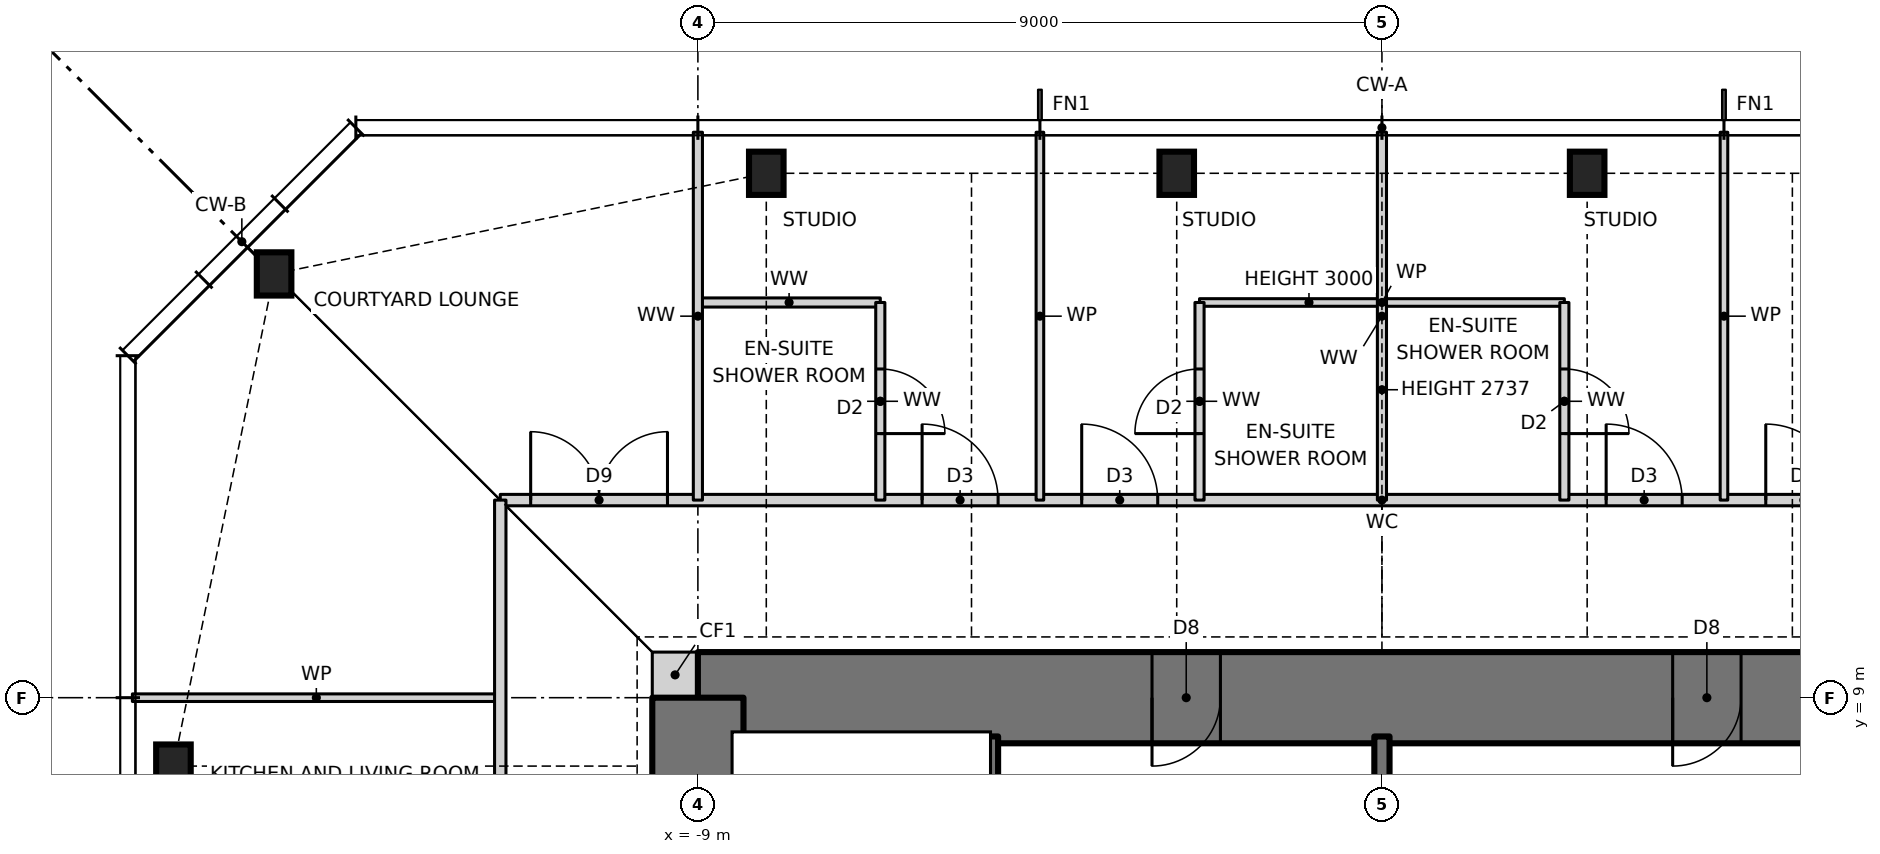
"""IFC4 building model, lengths in metres.
Left out: names, types, materials, properties, quantities, classifications, styles, units other than length and angle.
Written with IfcOpenShell. Run it as: python <this file> out.ifc"""

import sys

from ifc_helpers import new_model, si_unit, direction, frame, frame_2d, origin, origin_2d, place, context, subcontext, project, spatial, rectangle, i_section, extrude, element, fill, save


model = new_model("IFC4")
c1 = context("Model", 3, precision=1e-05, world=origin(), true_north=direction((0.0, 1.0)))
c2 = subcontext(c1, "Body", "Model", "MODEL_VIEW")
j1 = project(units=[si_unit("LENGTHUNIT", "METRE"), si_unit("PLANEANGLEUNIT", "RADIAN")], contexts=[c1])
p1 = place(None, origin())
s1 = spatial("IfcSite", under=j1, at=p1, CompositionType="ELEMENT")
p2 = place(p1, origin())
s2 = spatial("IfcBuilding", under=s1, at=p2, CompositionType="ELEMENT")
p3 = place(p2, frame((0.0, 0.0, 225.5)))
s3 = spatial("IfcBuildingStorey", under=s2, at=p3, CompositionType="ELEMENT", Elevation=225.5)
for number, where, z_axis, x_axis in (
    (1, (2.7, 15.9, 0.0), (0.0, 0.0, 1.0), (1.0, 0.0, 0.0)),
    (2, (-2.7, 15.9, 0.0), (0.0, 0.0, 1.0), (1.0, 0.0, 0.0)),
    (3, (-8.1, 15.9, 0.0), (0.0, 0.0, 1.0), (1.0, 0.0, 0.0)),
    (4, (-14.576, 14.576, 0.0), (0.0, 0.0, 1.0), (1.0, 0.0, 0.0)),
    (5, (-15.9, 8.1, 0.0), (0.0, 0.0, 1.0), (1.0, 0.0, 0.0)),
):
    element("IfcColumn", number, at=place(p3, frame(where, z_axis=z_axis, x_axis=x_axis)), inside=s3, PredefinedType="COLUMN", context=c2, shape_type="SweptSolid", body=[
        extrude(i_section(OverallWidth=0.455, OverallDepth=0.569, WebThickness=0.078, FlangeThickness=0.125, at=origin_2d()), origin(), (0.0, 0.0, 1.0), 3.5),
    ])
p4 = place(p3, frame((-9.6, 9.3, 0.0), z_axis=(0.0, 0.0, 1.0), x_axis=(1.0, 0.0, 0.0)))
e6 = element("IfcWall", 6, at=p4, inside=s3, PredefinedType="SOLIDWALL", context=c2, shape_type="SweptSolid", body=[
    extrude(rectangle(XDim=0.6, YDim=0.6, at=frame_2d((0.3, 0.0))), origin(), (0.0, 0.0, 1.0), 3.5),
])
p5 = place(p3, frame((9.0, 9.0, 0.0), z_axis=(0.0, 0.0, 1.0), x_axis=(-1.0, 0.0, 0.0)))
e7 = element("IfcWall", 7, at=p5, inside=s3, PredefinedType="SHEAR", context=c2, shape_type="SweptSolid", body=[
    extrude(rectangle(XDim=18.0, YDim=1.2, at=frame_2d((9.0, 0.0))), origin(), (0.0, 0.0, 1.0), 3.5),
])
p6 = place(p5, frame((11.125, 0.0, 0.0)))
e8 = element("IfcOpeningElement", 8, at=p6, cuts=e7, PredefinedType="OPENING", context=c2, shape_type="SweptSolid", body=[
    extrude(rectangle(XDim=0.9, YDim=2.1, at=frame_2d((0.45, 1.05))), frame((0.0, 0.61, 0.0), z_axis=(0.0, -1.0, 0.0), x_axis=(1.0, 0.0, 0.0)), (0.0, 0.0, 1.0), 1.22),
])
p7 = place(p5, frame((4.275, 0.0, 0.0)))
e9 = element("IfcOpeningElement", 9, at=p7, cuts=e7, PredefinedType="OPENING", context=c2, shape_type="SweptSolid", body=[
    extrude(rectangle(XDim=0.9, YDim=2.1, at=frame_2d((0.45, 1.05))), frame((0.0, 0.61, 0.0), z_axis=(0.0, -1.0, 0.0), x_axis=(1.0, 0.0, 0.0)), (0.0, 0.0, 1.0), 1.22),
])
p8 = place(p3, frame((-9.0, 9.0, 0.0), z_axis=(0.0, 0.0, 1.0), x_axis=(0.0, -1.0, 0.0)))
e10 = element("IfcWall", 10, at=p8, inside=s3, PredefinedType="SHEAR", context=c2, shape_type="SweptSolid", body=[
    extrude(rectangle(XDim=18.0, YDim=1.2, at=frame_2d((9.0, 0.0))), origin(), (0.0, 0.0, 1.0), 3.5),
])
p9 = place(p8, frame((8.5, 0.0, 0.0)))
e11 = element("IfcOpeningElement", 11, at=p9, cuts=e10, PredefinedType="OPENING", context=c2, shape_type="SweptSolid", body=[
    extrude(rectangle(XDim=1.0, YDim=2.1, at=frame_2d((0.5, 1.05))), frame((0.0, 0.61, 0.0), z_axis=(0.0, -1.0, 0.0), x_axis=(1.0, 0.0, 0.0)), (0.0, 0.0, 1.0), 1.22),
])
p10 = place(p3, frame((-16.44, 9.0, 0.0), z_axis=(0.0, 0.0, 1.0), x_axis=(1.0, 0.0, 0.0)))
e12 = element("IfcWall", 12, at=p10, inside=s3, PredefinedType="PARTITIONING", context=c2, shape_type="SweptSolid", body=[
    extrude(rectangle(XDim=4.84, YDim=0.1, at=frame_2d((2.42, 0.0))), origin(), (0.0, 0.0, 1.0), 3.27),
])
p11 = place(p3, frame((-11.6, 11.6, 0.0), z_axis=(0.0, 0.0, 1.0), x_axis=(1.0, 0.0, 0.0)))
e13 = element("IfcWall", 13, at=p11, inside=s3, PredefinedType="PARTITIONING", context=c2, shape_type="SweptSolid", body=[
    extrude(rectangle(XDim=23.2, YDim=0.15, at=frame_2d((11.6, 0.0))), origin(), (0.0, 0.0, 1.0), 3.27),
])
p12 = place(p11, frame((16.65, 0.0, 0.0)))
e14 = element("IfcOpeningElement", 14, at=p12, cuts=e13, PredefinedType="OPENING", context=c2, shape_type="SweptSolid", body=[
    extrude(rectangle(XDim=1.0, YDim=2.1, at=frame_2d((0.5, 1.05))), frame((0.0, 0.085, 0.0), z_axis=(0.0, -1.0, 0.0), x_axis=(1.0, 0.0, 0.0)), (0.0, 0.0, 1.0), 0.17),
])
p13 = place(p11, frame((14.55, 0.0, 0.0)))
e15 = element("IfcOpeningElement", 15, at=p13, cuts=e13, PredefinedType="OPENING", context=c2, shape_type="SweptSolid", body=[
    extrude(rectangle(XDim=1.0, YDim=2.1, at=frame_2d((0.5, 1.05))), frame((0.0, 0.085, 0.0), z_axis=(0.0, -1.0, 0.0), x_axis=(1.0, 0.0, 0.0)), (0.0, 0.0, 1.0), 0.17),
])
p14 = place(p11, frame((7.65, 0.0, 0.0)))
e16 = element("IfcOpeningElement", 16, at=p14, cuts=e13, PredefinedType="OPENING", context=c2, shape_type="SweptSolid", body=[
    extrude(rectangle(XDim=1.0, YDim=2.1, at=frame_2d((0.5, 1.05))), frame((0.0, 0.085, 0.0), z_axis=(0.0, -1.0, 0.0), x_axis=(1.0, 0.0, 0.0)), (0.0, 0.0, 1.0), 0.17),
])
p15 = place(p11, frame((5.55, 0.0, 0.0)))
e17 = element("IfcOpeningElement", 17, at=p15, cuts=e13, PredefinedType="OPENING", context=c2, shape_type="SweptSolid", body=[
    extrude(rectangle(XDim=1.0, YDim=2.1, at=frame_2d((0.5, 1.05))), frame((0.0, 0.085, 0.0), z_axis=(0.0, -1.0, 0.0), x_axis=(1.0, 0.0, 0.0)), (0.0, 0.0, 1.0), 0.17),
])
p16 = place(p11, frame((0.4, 0.0, 0.0)))
e18 = element("IfcOpeningElement", 18, at=p16, cuts=e13, PredefinedType="OPENING", context=c2, shape_type="SweptSolid", body=[
    extrude(rectangle(XDim=1.8, YDim=2.1, at=frame_2d((0.9, 1.05))), frame((0.0, 0.085, 0.0), z_axis=(0.0, -1.0, 0.0), x_axis=(1.0, 0.0, 0.0)), (0.0, 0.0, 1.0), 0.17),
])
p17 = place(p3, frame((-9.0, 14.2, 0.0), z_axis=(0.0, 0.0, 1.0), x_axis=(1.0, 0.0, 0.0)))
e19 = element("IfcWall", 19, at=p17, inside=s3, PredefinedType="PARTITIONING", context=c2, shape_type="SweptSolid", body=[
    extrude(rectangle(XDim=2.4, YDim=0.12, at=frame_2d((1.2, 0.0))), origin(), (0.0, 0.0, 1.0), 3.27),
])
p18 = place(p3, frame((-2.4, 14.2, 0.0), z_axis=(0.0, 0.0, 1.0), x_axis=(1.0, 0.0, 0.0)))
e20 = element("IfcWall", 20, at=p18, inside=s3, PredefinedType="PARTITIONING", context=c2, shape_type="SweptSolid", body=[
    extrude(rectangle(XDim=4.8, YDim=0.1, at=frame_2d((2.4, 0.0))), origin(), (0.0, 0.0, 1.0), 3.0),
])
p19 = place(p3, frame((4.5, 11.6, 0.0), z_axis=(0.0, 0.0, 1.0), x_axis=(0.0, 1.0, 0.0)))
e21 = element("IfcWall", 21, at=p19, inside=s3, PredefinedType="PARTITIONING", context=c2, shape_type="SweptSolid", body=[
    extrude(rectangle(XDim=4.84, YDim=0.1, at=frame_2d((2.42, 0.0))), origin(), (0.0, 0.0, 1.0), 3.27),
])
p20 = place(p3, frame((2.4, 11.6, 0.0), z_axis=(0.0, 0.0, 1.0), x_axis=(0.0, 1.0, 0.0)))
e22 = element("IfcWall", 22, at=p20, inside=s3, PredefinedType="PARTITIONING", context=c2, shape_type="SweptSolid", body=[
    extrude(rectangle(XDim=2.6, YDim=0.12, at=frame_2d((1.3, 0.0))), origin(), (0.0, 0.0, 1.0), 3.27),
])
p21 = place(p20, frame((0.875, 0.0, 0.0)))
e23 = element("IfcOpeningElement", 23, at=p21, cuts=e22, PredefinedType="OPENING", context=c2, shape_type="SweptSolid", body=[
    extrude(rectangle(XDim=0.85, YDim=2.1, at=frame_2d((0.425, 1.05))), frame((0.0, 0.07, 0.0), z_axis=(0.0, -1.0, 0.0), x_axis=(1.0, 0.0, 0.0)), (0.0, 0.0, 1.0), 0.14),
])
p22 = place(p3, frame((0.0, 4.4, 0.0), z_axis=(0.0, 0.0, 1.0), x_axis=(0.0, 1.0, 0.0)))
e24 = element("IfcWall", 24, at=p22, inside=s3, PredefinedType="SOLIDWALL", context=c2, shape_type="SweptSolid", body=[
    extrude(rectangle(XDim=4.09, YDim=0.2, at=frame_2d((2.045, 0.0))), origin(), (0.0, 0.0, 1.0), 3.5),
])
p23 = place(p3, frame((0.0, 11.6, 0.0), z_axis=(0.0, 0.0, 1.0), x_axis=(0.0, 1.0, 0.0)))
e25 = element("IfcWall", 25, at=p23, inside=s3, PredefinedType="PARTITIONING", context=c2, shape_type="SweptSolid", body=[
    extrude(rectangle(XDim=4.84, YDim=0.12, at=frame_2d((2.42, 0.0))), origin(), (0.0, 0.0, 1.0), 2.737),
])
p24 = place(p3, frame((-2.4, 11.6, 0.0), z_axis=(0.0, 0.0, 1.0), x_axis=(0.0, 1.0, 0.0)))
e26 = element("IfcWall", 26, at=p24, inside=s3, PredefinedType="PARTITIONING", context=c2, shape_type="SweptSolid", body=[
    extrude(rectangle(XDim=2.6, YDim=0.12, at=frame_2d((1.3, 0.0))), origin(), (0.0, 0.0, 1.0), 3.27),
])
p25 = place(p24, frame((0.875, 0.0, 0.0)))
e27 = element("IfcOpeningElement", 27, at=p25, cuts=e26, PredefinedType="OPENING", context=c2, shape_type="SweptSolid", body=[
    extrude(rectangle(XDim=0.85, YDim=2.1, at=frame_2d((0.425, 1.05))), frame((0.0, 0.07, 0.0), z_axis=(0.0, -1.0, 0.0), x_axis=(1.0, 0.0, 0.0)), (0.0, 0.0, 1.0), 0.14),
])
p26 = place(p3, frame((-4.5, 11.6, 0.0), z_axis=(0.0, 0.0, 1.0), x_axis=(0.0, 1.0, 0.0)))
e28 = element("IfcWall", 28, at=p26, inside=s3, PredefinedType="PARTITIONING", context=c2, shape_type="SweptSolid", body=[
    extrude(rectangle(XDim=4.84, YDim=0.1, at=frame_2d((2.42, 0.0))), origin(), (0.0, 0.0, 1.0), 3.27),
])
p27 = place(p3, frame((-5.15, 1.6, 0.0), z_axis=(0.0, 0.0, 1.0), x_axis=(0.0, 1.0, 0.0)))
e29 = element("IfcWall", 29, at=p27, inside=s3, PredefinedType="SOLIDWALL", context=c2, shape_type="SweptSolid", body=[
    extrude(rectangle(XDim=6.89, YDim=0.2, at=frame_2d((3.445, 0.0))), origin(), (0.0, 0.0, 1.0), 3.5),
])
p28 = place(p3, frame((-6.6, 11.6, 0.0), z_axis=(0.0, 0.0, 1.0), x_axis=(0.0, 1.0, 0.0)))
e30 = element("IfcWall", 30, at=p28, inside=s3, PredefinedType="PARTITIONING", context=c2, shape_type="SweptSolid", body=[
    extrude(rectangle(XDim=2.6, YDim=0.12, at=frame_2d((1.3, 0.0))), origin(), (0.0, 0.0, 1.0), 3.27),
])
p29 = place(p28, frame((0.875, 0.0, 0.0)))
e31 = element("IfcOpeningElement", 31, at=p29, cuts=e30, PredefinedType="OPENING", context=c2, shape_type="SweptSolid", body=[
    extrude(rectangle(XDim=0.85, YDim=2.1, at=frame_2d((0.425, 1.05))), frame((0.0, 0.07, 0.0), z_axis=(0.0, -1.0, 0.0), x_axis=(1.0, 0.0, 0.0)), (0.0, 0.0, 1.0), 0.14),
])
p30 = place(p3, frame((-9.0, 11.6, 0.0), z_axis=(0.0, 0.0, 1.0), x_axis=(0.0, 1.0, 0.0)))
e32 = element("IfcWall", 32, at=p30, inside=s3, PredefinedType="PARTITIONING", context=c2, shape_type="SweptSolid", body=[
    extrude(rectangle(XDim=4.84, YDim=0.12, at=frame_2d((2.42, 0.0))), origin(), (0.0, 0.0, 1.0), 3.27),
])
p31 = place(p3, frame((-11.6, -11.6, 0.0), z_axis=(0.0, 0.0, 1.0), x_axis=(0.0, 1.0, 0.0)))
e33 = element("IfcWall", 33, at=p31, inside=s3, PredefinedType="PARTITIONING", context=c2, shape_type="SweptSolid", body=[
    extrude(rectangle(XDim=23.2, YDim=0.15, at=frame_2d((11.6, 0.0))), origin(), (0.0, 0.0, 1.0), 3.27),
])
p32 = place(p31, frame((16.5, 0.0, 0.0)))
e34 = element("IfcOpeningElement", 34, at=p32, cuts=e33, PredefinedType="OPENING", context=c2, shape_type="SweptSolid", body=[
    extrude(rectangle(XDim=1.0, YDim=2.1, at=frame_2d((0.5, 1.05))), frame((0.0, 0.085, 0.0), z_axis=(0.0, -1.0, 0.0), x_axis=(1.0, 0.0, 0.0)), (0.0, 0.0, 1.0), 0.17),
])
p33 = place(p31, frame((10.05, 0.0, 0.0)))
e35 = element("IfcOpeningElement", 35, at=p33, cuts=e33, PredefinedType="OPENING", context=c2, shape_type="SweptSolid", body=[
    extrude(rectangle(XDim=1.0, YDim=2.1, at=frame_2d((0.5, 1.05))), frame((0.0, 0.085, 0.0), z_axis=(0.0, -1.0, 0.0), x_axis=(1.0, 0.0, 0.0)), (0.0, 0.0, 1.0), 0.17),
])
p34 = place(p31, frame((3.15, 0.0, 0.0)))
e36 = element("IfcOpeningElement", 36, at=p34, cuts=e33, PredefinedType="OPENING", context=c2, shape_type="SweptSolid", body=[
    extrude(rectangle(XDim=1.0, YDim=2.1, at=frame_2d((0.5, 1.05))), frame((0.0, 0.085, 0.0), z_axis=(0.0, -1.0, 0.0), x_axis=(1.0, 0.0, 0.0)), (0.0, 0.0, 1.0), 0.17),
])
p35 = place(p31, frame((0.875, 0.0, 0.0)))
e37 = element("IfcOpeningElement", 37, at=p35, cuts=e33, PredefinedType="OPENING", context=c2, shape_type="SweptSolid", body=[
    extrude(rectangle(XDim=0.85, YDim=2.1, at=frame_2d((0.425, 1.05))), frame((0.0, 0.085, 0.0), z_axis=(0.0, -1.0, 0.0), x_axis=(1.0, 0.0, 0.0)), (0.0, 0.0, 1.0), 0.17),
])
p36 = place(p12, origin())
e38 = element("IfcDoor", 38, at=p36, inside=s3, OperationType="SINGLE_SWING_LEFT", PredefinedType="DOOR", context=c2, shape_type="SweptSolid", body=[
    extrude(rectangle(XDim=1.0, YDim=2.1, at=frame_2d((0.5, 1.05))), frame((0.0, 0.025, 0.0), z_axis=(0.0, -1.0, 0.0), x_axis=(1.0, 0.0, 0.0)), (0.0, 0.0, 1.0), 0.05),
])
fill(e14, e38)
p37 = place(p13, origin())
e39 = element("IfcDoor", 39, at=p37, inside=s3, OperationType="SINGLE_SWING_LEFT", PredefinedType="DOOR", context=c2, shape_type="SweptSolid", body=[
    extrude(rectangle(XDim=1.0, YDim=2.1, at=frame_2d((0.5, 1.05))), frame((0.0, 0.025, 0.0), z_axis=(0.0, -1.0, 0.0), x_axis=(1.0, 0.0, 0.0)), (0.0, 0.0, 1.0), 0.05),
])
fill(e15, e39)
p38 = place(p21, frame((0.85, 0.0, 0.0), z_axis=(0.0, 0.0, 1.0), x_axis=(-1.0, 0.0, 0.0)))
e40 = element("IfcDoor", 40, at=p38, inside=s3, OperationType="SINGLE_SWING_RIGHT", PredefinedType="DOOR", context=c2, shape_type="SweptSolid", body=[
    extrude(rectangle(XDim=0.85, YDim=2.1, at=frame_2d((0.425, 1.05))), frame((0.0, 0.025, 0.0), z_axis=(0.0, -1.0, 0.0), x_axis=(1.0, 0.0, 0.0)), (0.0, 0.0, 1.0), 0.05),
])
fill(e23, e40)
p39 = place(p14, origin())
e41 = element("IfcDoor", 41, at=p39, inside=s3, OperationType="SINGLE_SWING_LEFT", PredefinedType="DOOR", context=c2, shape_type="SweptSolid", body=[
    extrude(rectangle(XDim=1.0, YDim=2.1, at=frame_2d((0.5, 1.05))), frame((0.0, 0.025, 0.0), z_axis=(0.0, -1.0, 0.0), x_axis=(1.0, 0.0, 0.0)), (0.0, 0.0, 1.0), 0.05),
])
fill(e16, e41)
p40 = place(p25, origin())
e42 = element("IfcDoor", 42, at=p40, inside=s3, OperationType="SINGLE_SWING_LEFT", PredefinedType="DOOR", context=c2, shape_type="SweptSolid", body=[
    extrude(rectangle(XDim=0.85, YDim=2.1, at=frame_2d((0.425, 1.05))), frame((0.0, 0.025, 0.0), z_axis=(0.0, -1.0, 0.0), x_axis=(1.0, 0.0, 0.0)), (0.0, 0.0, 1.0), 0.05),
])
fill(e27, e42)
p41 = place(p15, origin())
e43 = element("IfcDoor", 43, at=p41, inside=s3, OperationType="SINGLE_SWING_LEFT", PredefinedType="DOOR", context=c2, shape_type="SweptSolid", body=[
    extrude(rectangle(XDim=1.0, YDim=2.1, at=frame_2d((0.5, 1.05))), frame((0.0, 0.025, 0.0), z_axis=(0.0, -1.0, 0.0), x_axis=(1.0, 0.0, 0.0)), (0.0, 0.0, 1.0), 0.05),
])
fill(e17, e43)
p42 = place(p29, frame((0.85, 0.0, 0.0), z_axis=(0.0, 0.0, 1.0), x_axis=(-1.0, 0.0, 0.0)))
e44 = element("IfcDoor", 44, at=p42, inside=s3, OperationType="SINGLE_SWING_RIGHT", PredefinedType="DOOR", context=c2, shape_type="SweptSolid", body=[
    extrude(rectangle(XDim=0.85, YDim=2.1, at=frame_2d((0.425, 1.05))), frame((0.0, 0.025, 0.0), z_axis=(0.0, -1.0, 0.0), x_axis=(1.0, 0.0, 0.0)), (0.0, 0.0, 1.0), 0.05),
])
fill(e31, e44)
p43 = place(p16, origin())
e45 = element("IfcDoor", 45, at=p43, inside=s3, OperationType="DOUBLE_DOOR_SINGLE_SWING", PredefinedType="DOOR", context=c2, shape_type="SweptSolid", body=[
    extrude(rectangle(XDim=1.8, YDim=2.1, at=frame_2d((0.9, 1.05))), frame((0.0, 0.025, 0.0), z_axis=(0.0, -1.0, 0.0), x_axis=(1.0, 0.0, 0.0)), (0.0, 0.0, 1.0), 0.05),
])
fill(e18, e45)
p44 = place(p6, origin())
e46 = element("IfcDoor", 46, at=p44, inside=s3, OperationType="SINGLE_SWING_RIGHT", PredefinedType="DOOR", context=c2, shape_type="SweptSolid", body=[
    extrude(rectangle(XDim=0.9, YDim=2.1, at=frame_2d((0.45, 1.05))), frame((0.0, 0.025, 0.0), z_axis=(0.0, -1.0, 0.0), x_axis=(1.0, 0.0, 0.0)), (0.0, 0.0, 1.0), 0.05),
])
fill(e8, e46)
p45 = place(p7, origin())
e47 = element("IfcDoor", 47, at=p45, inside=s3, OperationType="SINGLE_SWING_RIGHT", PredefinedType="DOOR", context=c2, shape_type="SweptSolid", body=[
    extrude(rectangle(XDim=0.9, YDim=2.1, at=frame_2d((0.45, 1.05))), frame((0.0, 0.025, 0.0), z_axis=(0.0, -1.0, 0.0), x_axis=(1.0, 0.0, 0.0)), (0.0, 0.0, 1.0), 0.05),
])
fill(e9, e47)
save(model, sys.argv[1])
